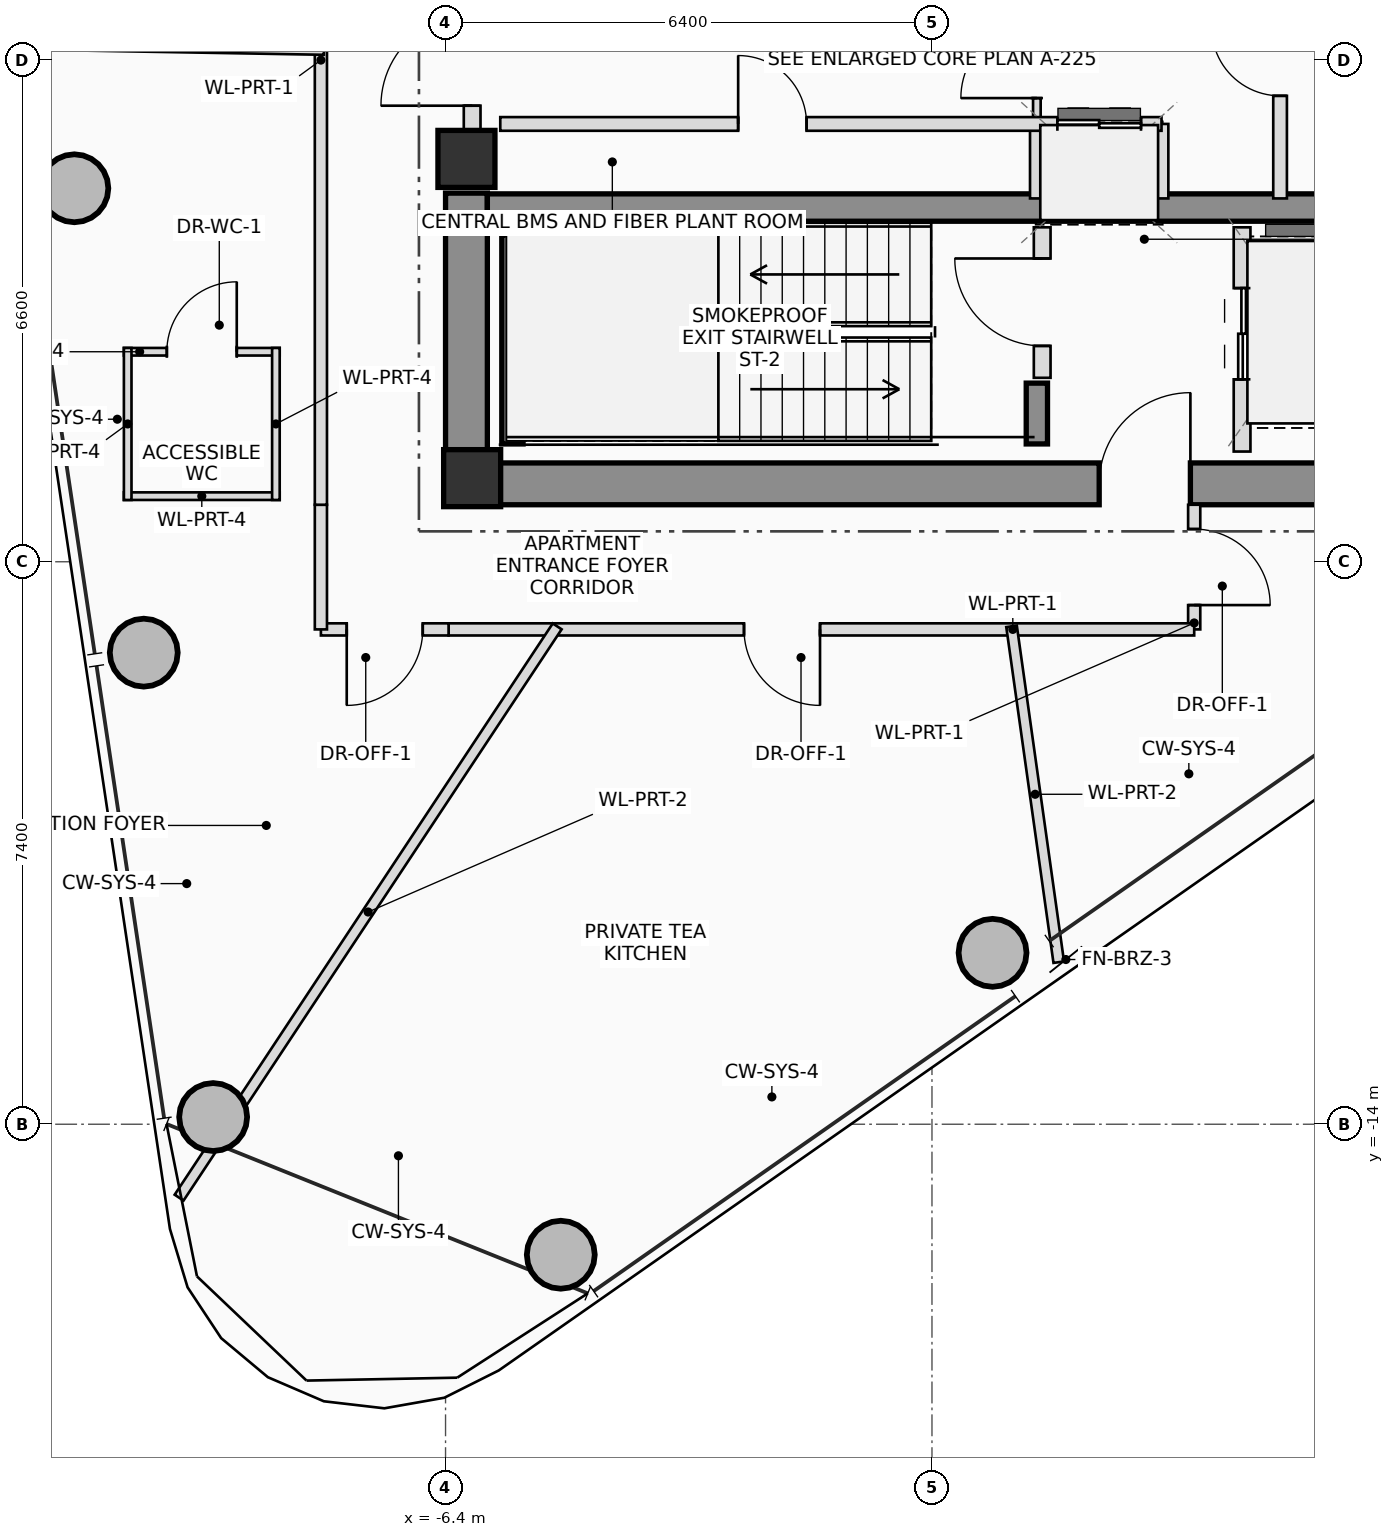
"""IFC4 building model, lengths in metres.
Left out: names, types, materials, properties, quantities, classifications, styles, units other than length and angle.
Written with IfcOpenShell. Run it as: python <this file> out.ifc"""

import sys

from ifc_helpers import new_model, si_unit, direction, frame, frame_2d, origin, origin_2d, place, context, subcontext, project, spatial, rectangle, hollow_circle, extrude, source, transform, mapped, element, fill, save


model = new_model("IFC4")
c1 = context("Model", 3, precision=1e-05, world=origin(), true_north=direction((0.0, 1.0)))
c2 = subcontext(c1, "Body", "Model", "MODEL_VIEW")
j1 = project(units=[si_unit("LENGTHUNIT", "METRE"), si_unit("PLANEANGLEUNIT", "RADIAN")], contexts=[c1])
p1 = place(None, origin())
s1 = spatial("IfcSite", under=j1, at=p1, CompositionType="ELEMENT")
p2 = place(p1, origin())
s2 = spatial("IfcBuilding", under=s1, at=p2, CompositionType="ELEMENT")
p3 = place(p2, frame((0.0, 0.0, 277.95)))
s3 = spatial("IfcBuildingStorey", under=s2, at=p3, CompositionType="ELEMENT", Elevation=277.95)
m1 = source(origin(), c2, "Body", "SweptSolid", [
    extrude(rectangle(XDim=0.75, YDim=0.75, at=origin_2d()), origin(), (0.0, 0.0, 1.0), 3.4),
])
p4 = place(p3, frame((-6.05, -5.5, 0.0), z_axis=(0.0, 0.0, 1.0), x_axis=(1.0, 0.0, 0.0)))
e1 = element("IfcColumn", 1, at=p4, inside=s3, PredefinedType="COLUMN", context=c2, shape_type="MappedRepresentation", body=[
    mapped(m1, transform((0.0, 0.0, 0.0), scale=1.0)),
])
p5 = place(p3, frame((-6.4, -5.575, 0.0), z_axis=(0.0, 0.0, 1.0), x_axis=(1.0, 0.0, 0.0)))
e2 = element("IfcWall", 2, at=p5, inside=s3, PredefinedType="SHEAR", context=c2, shape_type="SweptSolid", body=[
    extrude(rectangle(XDim=12.8, YDim=0.55, at=frame_2d((6.4, 0.0))), origin(), (0.0, 0.0, 1.0), 3.4),
])
p6 = place(p5, frame((8.6, 0.0, 0.0)))
e3 = element("IfcOpeningElement", 3, at=p6, cuts=e2, PredefinedType="OPENING", context=c2, shape_type="SweptSolid", body=[
    extrude(rectangle(XDim=1.2, YDim=2.2, at=frame_2d((0.6, 1.1))), frame((0.0, 0.285, 0.0), z_axis=(0.0, -1.0, 0.0), x_axis=(1.0, 0.0, 0.0)), (0.0, 0.0, 1.0), 0.57),
])
p7 = place(p3, frame((-6.125, -5.3, 0.0), z_axis=(0.0, 0.0, 1.0), x_axis=(0.0, 1.0, 0.0)))
e4 = element("IfcWall", 4, at=p7, inside=s3, PredefinedType="SHEAR", context=c2, shape_type="SweptSolid", body=[
    extrude(rectangle(XDim=3.55, YDim=0.55, at=frame_2d((1.775, 0.0))), origin(), (0.0, 0.0, 1.0), 3.4),
])
p8 = place(p3, frame((-5.85, -1.94, 0.0), z_axis=(0.0, 0.0, 1.0), x_axis=(1.0, 0.0, 0.0)))
e5 = element("IfcWall", 5, at=p8, inside=s3, PredefinedType="SHEAR", context=c2, shape_type="SweptSolid", body=[
    extrude(rectangle(XDim=11.7, YDim=0.36, at=frame_2d((5.85, 0.0))), origin(), (0.0, 0.0, 1.0), 3.4),
])
p9 = place(p3, frame((-5.52, -5.05, 0.0), z_axis=(0.0, 0.0, 1.0), x_axis=(0.0, 1.0, 0.0)))
e6 = element("IfcWall", 6, at=p9, inside=s3, PredefinedType="SHEAR", context=c2, shape_type="SweptSolid", body=[
    extrude(rectangle(XDim=2.75, YDim=0.28, at=frame_2d((1.375, 0.0))), origin(), (0.0, 0.0, 1.0), 3.4),
])
p10 = place(p3, frame((1.38, -5.05, 0.0), z_axis=(0.0, 0.0, 1.0), x_axis=(0.0, 1.0, 0.0)))
e7 = element("IfcWall", 7, at=p10, inside=s3, PredefinedType="SHEAR", context=c2, shape_type="SweptSolid", body=[
    extrude(rectangle(XDim=0.8, YDim=0.28, at=frame_2d((0.4, 0.0))), origin(), (0.0, 0.0, 1.0), 3.4),
])
p11 = place(p3, frame((-6.125, -1.3, 0.0), z_axis=(0.0, 0.0, 1.0), x_axis=(1.0, 0.0, 0.0)))
e8 = element("IfcColumn", 8, at=p11, inside=s3, PredefinedType="COLUMN", context=c2, shape_type="MappedRepresentation", body=[
    mapped(m1, transform((0.0, 0.0, 0.0), scale=1.0)),
])
m2 = source(origin(), c2, "Body", "SweptSolid", [
    extrude(hollow_circle(Radius=0.45, WallThickness=0.032, at=origin_2d()), origin(), (0.0, 0.0, 1.0), 3.4),
])
for number, where, z_axis, x_axis in (
    (9, (-4.884, -15.717, 0.0), (0.0, 0.0, 1.0), (1.0, 0.0, 0.0)),
    (10, (0.797, -11.745, 0.0), (0.0, 0.0, 1.0), (1.0, 0.0, 0.0)),
    (11, (-11.284, -1.686, 0.0), (0.0, 0.0, 1.0), (1.0, 0.0, 0.0)),
    (12, (-10.371, -7.796, 0.0), (0.0, 0.0, 1.0), (1.0, 0.0, 0.0)),
    (13, (-9.458, -13.905, 0.0), (0.0, 0.0, 1.0), (1.0, 0.0, 0.0)),
):
    element("IfcColumn", number, at=place(p3, frame(where, z_axis=z_axis, x_axis=x_axis)), inside=s3, PredefinedType="COLUMN", context=c2, shape_type="MappedRepresentation", body=[
        mapped(m2, transform((0.0, 0.0, 0.0), scale=1.0)),
    ])
p12 = place(p3, frame((-6.05, -0.95, 0.0), z_axis=(0.0, 0.0, 1.0), x_axis=(0.0, 1.0, 0.0)))
e14 = element("IfcWall", 14, at=p12, inside=s3, PredefinedType="PLUMBINGWALL", context=c2, shape_type="SweptSolid", body=[
    extrude(rectangle(XDim=1.9, YDim=0.22, at=frame_2d((0.95, 0.0))), origin(), (0.0, 0.0, 1.0), 2.18),
])
p13 = place(p12, frame((0.35, 0.0, 0.0)))
e15 = element("IfcOpeningElement", 15, at=p13, cuts=e14, PredefinedType="OPENING", context=c2, shape_type="SweptSolid", body=[
    extrude(rectangle(XDim=1.2, YDim=2.2, at=frame_2d((0.6, 1.1))), frame((0.0, 0.12, 0.0), z_axis=(0.0, -1.0, 0.0), x_axis=(1.0, 0.0, 0.0)), (0.0, 0.0, 1.0), 0.24),
])
p14 = place(p3, frame((1.45, -4.18, 0.0), z_axis=(0.0, 0.0, 1.0), x_axis=(0.0, 1.0, 0.0)))
e16 = element("IfcWall", 16, at=p14, inside=s3, PredefinedType="PLUMBINGWALL", context=c2, shape_type="SweptSolid", body=[
    extrude(rectangle(XDim=1.98, YDim=0.22, at=frame_2d((0.99, 0.0))), origin(), (0.0, 0.0, 1.0), 3.2),
])
p15 = place(p14, frame((0.42, 0.0, 0.0)))
e17 = element("IfcOpeningElement", 17, at=p15, cuts=e16, PredefinedType="OPENING", context=c2, shape_type="SweptSolid", body=[
    extrude(rectangle(XDim=1.15, YDim=2.15, at=frame_2d((0.575, 1.075))), frame((0.0, 0.12, 0.0), z_axis=(0.0, -1.0, 0.0), x_axis=(1.0, 0.0, 0.0)), (0.0, 0.0, 1.0), 0.24),
])
p16 = place(p3, frame((4.08, -5.15, 0.0), z_axis=(0.0, 0.0, 1.0), x_axis=(0.0, 1.0, 0.0)))
e18 = element("IfcWall", 18, at=p16, inside=s3, PredefinedType="PLUMBINGWALL", context=c2, shape_type="SweptSolid", body=[
    extrude(rectangle(XDim=2.95, YDim=0.22, at=frame_2d((1.475, 0.0))), origin(), (0.0, 0.0, 1.0), 3.2),
])
p17 = place(p16, frame((0.95, 0.0, 0.0)))
e19 = element("IfcOpeningElement", 19, at=p17, cuts=e18, PredefinedType="OPENING", context=c2, shape_type="SweptSolid", body=[
    extrude(rectangle(XDim=1.2, YDim=2.25, at=frame_2d((0.6, 1.125))), frame((0.0, 0.12, 0.0), z_axis=(0.0, -1.0, 0.0), x_axis=(1.0, 0.0, 0.0)), (0.0, 0.0, 1.0), 0.24),
])
p18 = place(p3, frame((1.38, -0.84, 0.0), z_axis=(0.0, 0.0, 1.0), x_axis=(0.0, 1.0, 0.0)))
e20 = element("IfcWall", 20, at=p18, inside=s3, PredefinedType="PARTITIONING", context=c2, shape_type="SweptSolid", body=[
    extrude(rectangle(XDim=1.68, YDim=0.1, at=frame_2d((0.84, 0.0))), origin(), (0.0, 0.0, 1.0), 3.2),
])
p19 = place(p18, frame((0.34, 0.0, 0.0)))
e21 = element("IfcOpeningElement", 21, at=p19, cuts=e20, PredefinedType="OPENING", context=c2, shape_type="SweptSolid", body=[
    extrude(rectangle(XDim=1.0, YDim=2.25, at=frame_2d((0.5, 1.125))), frame((0.0, 0.06, 0.0), z_axis=(0.0, -1.0, 0.0), x_axis=(1.0, 0.0, 0.0)), (0.0, 0.0, 1.0), 0.12),
])
for number, where, z_axis, x_axis in (
    (22, (1.38, -1.82, 0.0), (0.0, 0.0, 1.0), (0.0, 1.0, 0.0)),
    (23, (3.02, -1.82, 0.0), (0.0, 0.0, 1.0), (0.0, 1.0, 0.0)),
):
    element("IfcWall", number, at=place(p3, frame(where, z_axis=z_axis, x_axis=x_axis)), inside=s3, PredefinedType="PLUMBINGWALL", context=c2, shape_type="SweptSolid", body=[
        extrude(rectangle(XDim=0.98, YDim=0.18, at=frame_2d((0.49, 0.0))), origin(), (0.0, 0.0, 1.0), 3.2),
    ])
p20 = place(p3, frame((4.58, -1.82, 0.0), z_axis=(0.0, 0.0, 1.0), x_axis=(0.0, 1.0, 0.0)))
e24 = element("IfcWall", 24, at=p20, inside=s3, PredefinedType="PLUMBINGWALL", context=c2, shape_type="SweptSolid", body=[
    extrude(rectangle(XDim=3.64, YDim=0.18, at=frame_2d((1.82, 0.0))), origin(), (0.0, 0.0, 1.0), 3.2),
])
p21 = place(p20, frame((1.35, 0.0, 0.0)))
e25 = element("IfcOpeningElement", 25, at=p21, cuts=e24, PredefinedType="OPENING", context=c2, shape_type="SweptSolid", body=[
    extrude(rectangle(XDim=0.9, YDim=2.05, at=frame_2d((0.45, 1.025))), frame((0.0, 0.1, 0.0), z_axis=(0.0, -1.0, 0.0), x_axis=(1.0, 0.0, 0.0)), (0.0, 0.0, 1.0), 0.2),
])
p22 = place(p3, frame((-5.68, -0.84, 0.0), z_axis=(0.0, 0.0, 1.0), x_axis=(1.0, 0.0, 0.0)))
e26 = element("IfcWall", 26, at=p22, inside=s3, PredefinedType="PLUMBINGWALL", context=c2, shape_type="SweptSolid", body=[
    extrude(rectangle(XDim=8.7, YDim=0.18, at=frame_2d((4.35, 0.0))), origin(), (0.0, 0.0, 1.0), 3.2),
])
p23 = place(p22, frame((3.13, 0.0, 0.0)))
e27 = element("IfcOpeningElement", 27, at=p23, cuts=e26, PredefinedType="OPENING", context=c2, shape_type="SweptSolid", body=[
    extrude(rectangle(XDim=0.9, YDim=2.05, at=frame_2d((0.45, 1.025))), frame((0.0, 0.1, 0.0), z_axis=(0.0, -1.0, 0.0), x_axis=(1.0, 0.0, 0.0)), (0.0, 0.0, 1.0), 0.2),
])
p24 = place(p22, frame((7.33, 0.0, 0.0)))
e28 = element("IfcOpeningElement", 28, at=p24, cuts=e26, PredefinedType="OPENING", context=c2, shape_type="SweptSolid", body=[
    extrude(rectangle(XDim=1.1, YDim=2.2, at=frame_2d((0.55, 1.1))), frame((0.0, 0.1, 0.0), z_axis=(0.0, -1.0, 0.0), x_axis=(1.0, 0.0, 0.0)), (0.0, 0.0, 1.0), 0.2),
])
p25 = place(p3, frame((-10.632, -3.837, 0.0), z_axis=(0.0, 0.0, 1.0), x_axis=(1.0, 0.0, 0.0)))
e29 = element("IfcWall", 29, at=p25, inside=s3, PredefinedType="PARTITIONING", context=c2, shape_type="SweptSolid", body=[
    extrude(rectangle(XDim=2.05, YDim=0.1, at=frame_2d((1.025, 0.0))), origin(), (0.0, 0.0, 1.0), 2.805),
])
p26 = place(p25, frame((0.565, 0.0, 0.0)))
e30 = element("IfcOpeningElement", 30, at=p26, cuts=e29, PredefinedType="OPENING", context=c2, shape_type="SweptSolid", body=[
    extrude(rectangle(XDim=0.92, YDim=2.1, at=frame_2d((0.46, 1.05))), frame((0.0, 0.06, 0.0), z_axis=(0.0, -1.0, 0.0), x_axis=(1.0, 0.0, 0.0)), (0.0, 0.0, 1.0), 0.12),
])
p27 = place(p3, frame((-8.582, -5.737, 0.0), z_axis=(0.0, 0.0, 1.0), x_axis=(-1.0, 0.0, 0.0)))
e31 = element("IfcWall", 31, at=p27, inside=s3, PredefinedType="PARTITIONING", context=c2, shape_type="SweptSolid", body=[
    extrude(rectangle(XDim=2.05, YDim=0.1, at=frame_2d((1.025, 0.0))), origin(), (0.0, 0.0, 1.0), 2.765),
])
p28 = place(p3, frame((-8.632, -3.787, 0.0), z_axis=(0.0, 0.0, 1.0), x_axis=(0.0, -1.0, 0.0)))
e32 = element("IfcWall", 32, at=p28, inside=s3, PredefinedType="PARTITIONING", context=c2, shape_type="SweptSolid", body=[
    extrude(rectangle(XDim=2.0, YDim=0.1, at=frame_2d((1.0, 0.0))), origin(), (0.0, 0.0, 1.0), 2.805),
])
p29 = place(p3, frame((-10.582, -5.787, 0.0), z_axis=(0.0, 0.0, 1.0), x_axis=(0.0, 1.0, 0.0)))
e33 = element("IfcWall", 33, at=p29, inside=s3, PredefinedType="PARTITIONING", context=c2, shape_type="SweptSolid", body=[
    extrude(rectangle(XDim=2.0, YDim=0.1, at=frame_2d((1.0, 0.0))), origin(), (0.0, 0.0, 1.0), 2.765),
])
p30 = place(p3, frame((3.45, -5.85, 0.0), z_axis=(0.0, 0.0, 1.0), x_axis=(0.0, -1.0, 0.0)))
e34 = element("IfcWall", 34, at=p30, inside=s3, PredefinedType="PARTITIONING", context=c2, shape_type="SweptSolid", body=[
    extrude(rectangle(XDim=1.64, YDim=0.16, at=frame_2d((0.82, 0.0))), origin(), (0.0, 0.0, 1.0), 3.2),
])
p31 = place(p30, frame((0.32, 0.0, 0.0)))
e35 = element("IfcOpeningElement", 35, at=p31, cuts=e34, PredefinedType="OPENING", context=c2, shape_type="SweptSolid", body=[
    extrude(rectangle(XDim=1.0, YDim=2.25, at=frame_2d((0.5, 1.125))), frame((0.0, 0.09, 0.0), z_axis=(0.0, -1.0, 0.0), x_axis=(1.0, 0.0, 0.0)), (0.0, 0.0, 1.0), 0.18),
])
p32 = place(p3, frame((3.45, -7.49, 0.0), z_axis=(0.0, 0.0, 1.0), x_axis=(-1.0, 0.0, 0.0)))
e36 = element("IfcWall", 36, at=p32, inside=s3, PredefinedType="PARTITIONING", context=c2, shape_type="SweptSolid", body=[
    extrude(rectangle(XDim=9.81, YDim=0.16, at=frame_2d((4.905, 0.0))), origin(), (0.0, 0.0, 1.0), 2.605),
])
p33 = place(p32, frame((4.923, 0.0, 0.0)))
e37 = element("IfcOpeningElement", 37, at=p33, cuts=e36, PredefinedType="OPENING", context=c2, shape_type="SweptSolid", body=[
    extrude(rectangle(XDim=1.0, YDim=2.25, at=frame_2d((0.5, 1.125))), frame((0.0, 0.09, 0.0), z_axis=(0.0, -1.0, 0.0), x_axis=(1.0, 0.0, 0.0)), (0.0, 0.0, 1.0), 0.18),
])
p34 = place(p3, frame((-6.36, -7.49, 0.0), z_axis=(0.0, 0.0, 1.0), x_axis=(-1.0, 0.0, 0.0)))
e38 = element("IfcWall", 38, at=p34, inside=s3, PredefinedType="PARTITIONING", context=c2, shape_type="SweptSolid", body=[
    extrude(rectangle(XDim=1.68, YDim=0.16, at=frame_2d((0.84, 0.0))), origin(), (0.0, 0.0, 1.0), 2.605),
])
p35 = place(p34, frame((0.34, 0.0, 0.0)))
e39 = element("IfcOpeningElement", 39, at=p35, cuts=e38, PredefinedType="OPENING", context=c2, shape_type="SweptSolid", body=[
    extrude(rectangle(XDim=1.0, YDim=2.25, at=frame_2d((0.5, 1.125))), frame((0.0, 0.09, 0.0), z_axis=(0.0, -1.0, 0.0), x_axis=(1.0, 0.0, 0.0)), (0.0, 0.0, 1.0), 0.18),
])
p36 = place(p3, frame((-8.04, -7.49, 0.0), z_axis=(0.0, 0.0, 1.0), x_axis=(0.0, 1.0, 0.0)))
e40 = element("IfcWall", 40, at=p36, inside=s3, PredefinedType="PARTITIONING", context=c2, shape_type="SweptSolid", body=[
    extrude(rectangle(XDim=1.64, YDim=0.16, at=frame_2d((0.82, 0.0))), origin(), (0.0, 0.0, 1.0), 2.605),
])
p37 = place(p3, frame((-8.04, -5.85, 0.0), z_axis=(0.0, 0.0, 1.0), x_axis=(0.0, 1.0, 0.0)))
e41 = element("IfcWall", 41, at=p37, inside=s3, PredefinedType="PARTITIONING", context=c2, shape_type="SweptSolid", body=[
    extrude(rectangle(XDim=11.7, YDim=0.16, at=frame_2d((5.85, 0.0))), origin(), (0.0, 0.0, 1.0), 2.605),
])
p38 = place(p3, frame((-8.0, 0.14, 0.0), z_axis=(0.0, 0.0, 1.0), x_axis=(-0.999848132876, 0.017427311435, 0.0)))
e42 = element("IfcWall", 42, at=p38, inside=s3, PredefinedType="PARTITIONING", context=c2, shape_type="SweptSolid", body=[
    extrude(rectangle(XDim=4.175, YDim=0.14, at=frame_2d((2.087, 0.0))), origin(), (0.0, 0.0, 1.0), 2.765),
])
p39 = place(p3, frame((-4.931, -7.45, 0.0), z_axis=(0.0, 0.0, 1.0), x_axis=(-0.551953051788, -0.833875187676, 0.0)))
e43 = element("IfcWall", 43, at=p39, inside=s3, PredefinedType="PARTITIONING", context=c2, shape_type="SweptSolid", body=[
    extrude(rectangle(XDim=9.013, YDim=0.14, at=frame_2d((4.507, 0.0))), origin(), (0.0, 0.0, 1.0), 2.605),
])
p40 = place(p3, frame((1.047, -7.45, 0.0), z_axis=(0.0, 0.0, 1.0), x_axis=(0.139153381551, -0.990270839924, 0.0)))
e44 = element("IfcWall", 44, at=p40, inside=s3, PredefinedType="PARTITIONING", context=c2, shape_type="SweptSolid", body=[
    extrude(rectangle(XDim=4.462, YDim=0.14, at=frame_2d((2.231, 0.0))), origin(), (0.0, 0.0, 1.0), 2.605),
])
p41 = place(p6, origin())
e45 = element("IfcDoor", 45, at=p41, inside=s3, OperationType="SINGLE_SWING_RIGHT", PredefinedType="DOOR", context=c2, shape_type="SweptSolid", body=[
    extrude(rectangle(XDim=1.2, YDim=2.2, at=frame_2d((0.6, 1.1))), frame((0.0, 0.025, 0.0), z_axis=(0.0, -1.0, 0.0), x_axis=(1.0, 0.0, 0.0)), (0.0, 0.0, 1.0), 0.05),
])
fill(e3, e45)
p42 = place(p13, origin())
e46 = element("IfcDoor", 46, at=p42, inside=s3, OperationType="SINGLE_SWING_LEFT", PredefinedType="DOOR", context=c2, shape_type="SweptSolid", body=[
    extrude(rectangle(XDim=1.2, YDim=2.2, at=frame_2d((0.6, 1.1))), frame((0.0, 0.025, 0.0), z_axis=(0.0, -1.0, 0.0), x_axis=(1.0, 0.0, 0.0)), (0.0, 0.0, 1.0), 0.05),
])
fill(e15, e46)
p43 = place(p15, origin())
e47 = element("IfcDoor", 47, at=p43, inside=s3, OperationType="SINGLE_SWING_RIGHT", PredefinedType="DOOR", context=c2, shape_type="SweptSolid", body=[
    extrude(rectangle(XDim=1.15, YDim=2.15, at=frame_2d((0.575, 1.075))), frame((0.0, 0.025, 0.0), z_axis=(0.0, -1.0, 0.0), x_axis=(1.0, 0.0, 0.0)), (0.0, 0.0, 1.0), 0.05),
])
fill(e17, e47)
p44 = place(p17, origin())
e48 = element("IfcDoor", 48, at=p44, inside=s3, OperationType="DOUBLE_DOOR_SLIDING", PredefinedType="DOOR", context=c2, shape_type="SweptSolid", body=[
    extrude(rectangle(XDim=1.2, YDim=2.25, at=frame_2d((0.6, 1.125))), frame((0.0, 0.025, 0.0), z_axis=(0.0, -1.0, 0.0), x_axis=(1.0, 0.0, 0.0)), (0.0, 0.0, 1.0), 0.05),
])
fill(e19, e48)
p45 = place(p19, origin())
e49 = element("IfcDoor", 49, at=p45, inside=s3, OperationType="SINGLE_SWING_LEFT", PredefinedType="DOOR", context=c2, shape_type="SweptSolid", body=[
    extrude(rectangle(XDim=1.0, YDim=2.25, at=frame_2d((0.5, 1.125))), frame((0.0, 0.025, 0.0), z_axis=(0.0, -1.0, 0.0), x_axis=(1.0, 0.0, 0.0)), (0.0, 0.0, 1.0), 0.05),
])
fill(e21, e49)
p46 = place(p21, origin())
e50 = element("IfcDoor", 50, at=p46, inside=s3, OperationType="SINGLE_SWING_RIGHT", PredefinedType="DOOR", context=c2, shape_type="SweptSolid", body=[
    extrude(rectangle(XDim=0.9, YDim=2.05, at=frame_2d((0.45, 1.025))), frame((0.0, 0.025, 0.0), z_axis=(0.0, -1.0, 0.0), x_axis=(1.0, 0.0, 0.0)), (0.0, 0.0, 1.0), 0.05),
])
fill(e25, e50)
p47 = place(p23, origin())
e51 = element("IfcDoor", 51, at=p47, inside=s3, OperationType="SINGLE_SWING_LEFT", PredefinedType="DOOR", context=c2, shape_type="SweptSolid", body=[
    extrude(rectangle(XDim=0.9, YDim=2.05, at=frame_2d((0.45, 1.025))), frame((0.0, 0.025, 0.0), z_axis=(0.0, -1.0, 0.0), x_axis=(1.0, 0.0, 0.0)), (0.0, 0.0, 1.0), 0.05),
])
fill(e27, e51)
p48 = place(p24, origin())
e52 = element("IfcDoor", 52, at=p48, inside=s3, OperationType="DOUBLE_DOOR_SLIDING", PredefinedType="DOOR", context=c2, shape_type="SweptSolid", body=[
    extrude(rectangle(XDim=1.1, YDim=2.2, at=frame_2d((0.55, 1.1))), frame((0.0, 0.025, 0.0), z_axis=(0.0, -1.0, 0.0), x_axis=(1.0, 0.0, 0.0)), (0.0, 0.0, 1.0), 0.05),
])
fill(e28, e52)
p49 = place(p26, origin())
e53 = element("IfcDoor", 53, at=p49, inside=s3, OperationType="SINGLE_SWING_RIGHT", PredefinedType="DOOR", context=c2, shape_type="SweptSolid", body=[
    extrude(rectangle(XDim=0.92, YDim=2.1, at=frame_2d((0.46, 1.05))), frame((0.0, 0.025, 0.0), z_axis=(0.0, -1.0, 0.0), x_axis=(1.0, 0.0, 0.0)), (0.0, 0.0, 1.0), 0.05),
])
fill(e30, e53)
p50 = place(p31, origin())
e54 = element("IfcDoor", 54, at=p50, inside=s3, OperationType="SINGLE_SWING_RIGHT", PredefinedType="DOOR", context=c2, shape_type="SweptSolid", body=[
    extrude(rectangle(XDim=1.0, YDim=2.25, at=frame_2d((0.5, 1.125))), frame((0.0, 0.025, 0.0), z_axis=(0.0, -1.0, 0.0), x_axis=(1.0, 0.0, 0.0)), (0.0, 0.0, 1.0), 0.05),
])
fill(e35, e54)
p51 = place(p33, origin())
e55 = element("IfcDoor", 55, at=p51, inside=s3, OperationType="SINGLE_SWING_LEFT", PredefinedType="DOOR", context=c2, shape_type="SweptSolid", body=[
    extrude(rectangle(XDim=1.0, YDim=2.25, at=frame_2d((0.5, 1.125))), frame((0.0, 0.025, 0.0), z_axis=(0.0, -1.0, 0.0), x_axis=(1.0, 0.0, 0.0)), (0.0, 0.0, 1.0), 0.05),
])
fill(e37, e55)
p52 = place(p35, origin())
e56 = element("IfcDoor", 56, at=p52, inside=s3, OperationType="SINGLE_SWING_RIGHT", PredefinedType="DOOR", context=c2, shape_type="SweptSolid", body=[
    extrude(rectangle(XDim=1.0, YDim=2.25, at=frame_2d((0.5, 1.125))), frame((0.0, 0.025, 0.0), z_axis=(0.0, -1.0, 0.0), x_axis=(1.0, 0.0, 0.0)), (0.0, 0.0, 1.0), 0.05),
])
fill(e39, e56)
save(model, sys.argv[1])
